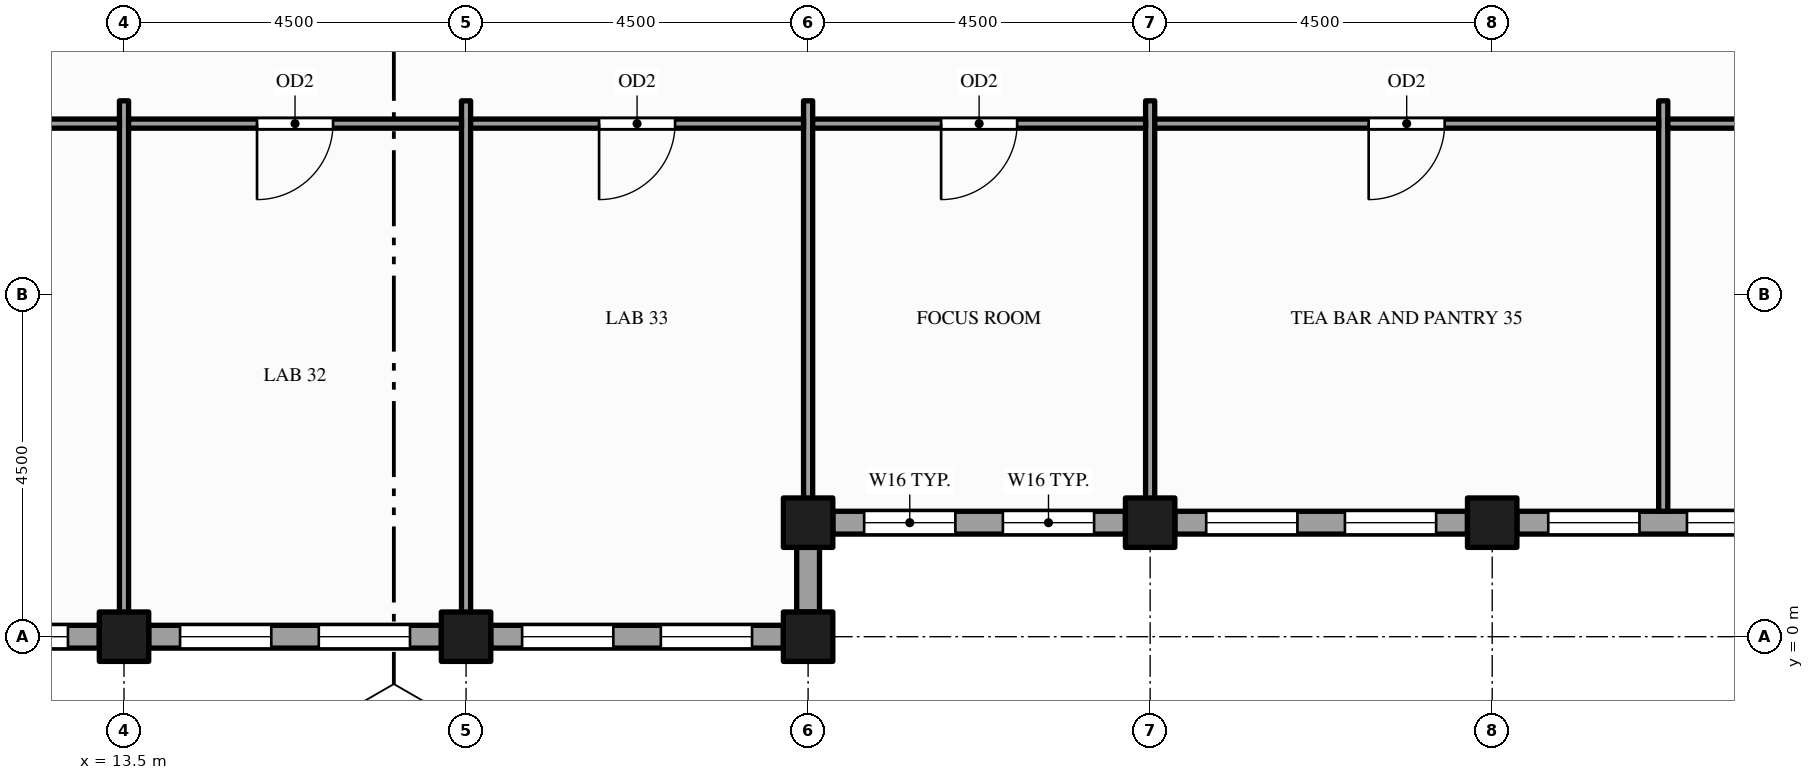
"""IFC4 building model, lengths in metres.
Left out: names, types, materials, properties, quantities, classifications, styles, units other than length and angle.
Written with IfcOpenShell. Run it as: python <this file> out.ifc"""

import sys

from ifc_helpers import new_model, si_unit, direction, frame, frame_2d, origin, origin_2d, place, context, subcontext, project, spatial, rectangle, hollow_rectangle, extrude, element, fill, save


model = new_model("IFC4")
c1 = context("Model", 3, precision=1e-05, world=origin(), true_north=direction((0.0, 1.0)))
c2 = subcontext(c1, "Body", "Model", "MODEL_VIEW")
j1 = project(units=[si_unit("LENGTHUNIT", "METRE"), si_unit("PLANEANGLEUNIT", "RADIAN")], contexts=[c1])
p1 = place(None, origin())
s1 = spatial("IfcSite", under=j1, at=p1, CompositionType="ELEMENT")
p2 = place(p1, origin())
s2 = spatial("IfcBuilding", under=s1, at=p2, CompositionType="ELEMENT")
p3 = place(p2, frame((0.0, 0.0, 273.0)))
s3 = spatial("IfcBuildingStorey", under=s2, at=p3, CompositionType="ELEMENT", Elevation=273.0)
for number, where, z_axis, x_axis in (
    (1, (13.5, 0.0, -0.15), (0.0, 0.0, 1.0), (1.0, 0.0, 0.0)),
    (2, (18.0, 0.0, -0.15), (0.0, 0.0, 1.0), (1.0, 0.0, 0.0)),
    (3, (22.5, 0.0, -0.15), (0.0, 0.0, 1.0), (1.0, 0.0, 0.0)),
    (4, (22.5, 1.5, -0.15), (0.0, 0.0, 1.0), (1.0, 0.0, 0.0)),
    (5, (27.0, 1.5, -0.15), (0.0, 0.0, 1.0), (1.0, 0.0, 0.0)),
    (6, (31.5, 1.5, -0.15), (0.0, 0.0, 1.0), (1.0, 0.0, 0.0)),
):
    element("IfcColumn", number, at=place(p3, frame(where, z_axis=z_axis, x_axis=x_axis)), inside=s3, PredefinedType="COLUMN", context=c2, shape_type="SweptSolid", body=[
        extrude(hollow_rectangle(XDim=0.65, YDim=0.65, WallThickness=0.032, at=origin_2d()), origin(), (0.0, 0.0, 1.0), 4.0),
    ])
p4 = place(p3, frame((22.5, 0.325, 0.0), z_axis=(0.0, 0.0, 1.0), x_axis=(0.0, 1.0, 0.0)))
e7 = element("IfcWall", 7, at=p4, inside=s3, PredefinedType="STANDARD", context=c2, shape_type="SweptSolid", body=[
    extrude(rectangle(XDim=0.85, YDim=0.3, at=frame_2d((0.425, 0.0))), origin(), (0.0, 0.0, 1.0), 3.162),
])
p5 = place(p3, frame((22.825, 1.5, 0.0), z_axis=(0.0, 0.0, 1.0), x_axis=(1.0, 0.0, 0.0)))
e8 = element("IfcWall", 8, at=p5, inside=s3, PredefinedType="STANDARD", context=c2, shape_type="SweptSolid", body=[
    extrude(rectangle(XDim=3.85, YDim=0.3, at=frame_2d((1.925, 0.0))), origin(), (0.0, 0.0, 1.0), 2.87),
])
p6 = place(p5, frame((0.413, 0.0, 0.9)))
e9 = element("IfcOpeningElement", 9, at=p6, cuts=e8, PredefinedType="OPENING", context=c2, shape_type="SweptSolid", body=[
    extrude(rectangle(XDim=1.2, YDim=1.75, at=frame_2d((0.6, 0.875))), frame((0.0, 0.16, 0.0), z_axis=(0.0, -1.0, 0.0), x_axis=(1.0, 0.0, 0.0)), (0.0, 0.0, 1.0), 0.32),
])
p7 = place(p5, frame((2.238, 0.0, 0.9)))
e10 = element("IfcOpeningElement", 10, at=p7, cuts=e8, PredefinedType="OPENING", context=c2, shape_type="SweptSolid", body=[
    extrude(rectangle(XDim=1.2, YDim=1.75, at=frame_2d((0.6, 0.875))), frame((0.0, 0.16, 0.0), z_axis=(0.0, -1.0, 0.0), x_axis=(1.0, 0.0, 0.0)), (0.0, 0.0, 1.0), 0.32),
])
p8 = place(p3, frame((27.325, 1.5, 0.0), z_axis=(0.0, 0.0, 1.0), x_axis=(1.0, 0.0, 0.0)))
e11 = element("IfcWall", 11, at=p8, inside=s3, PredefinedType="STANDARD", context=c2, shape_type="SweptSolid", body=[
    extrude(rectangle(XDim=3.85, YDim=0.3, at=frame_2d((1.925, 0.0))), origin(), (0.0, 0.0, 1.0), 2.87),
])
p9 = place(p8, frame((0.413, 0.0, 0.9)))
e12 = element("IfcOpeningElement", 12, at=p9, cuts=e11, PredefinedType="OPENING", context=c2, shape_type="SweptSolid", body=[
    extrude(rectangle(XDim=1.2, YDim=1.75, at=frame_2d((0.6, 0.875))), frame((0.0, 0.16, 0.0), z_axis=(0.0, -1.0, 0.0), x_axis=(1.0, 0.0, 0.0)), (0.0, 0.0, 1.0), 0.32),
])
p10 = place(p8, frame((2.238, 0.0, 0.9)))
e13 = element("IfcOpeningElement", 13, at=p10, cuts=e11, PredefinedType="OPENING", context=c2, shape_type="SweptSolid", body=[
    extrude(rectangle(XDim=1.2, YDim=1.75, at=frame_2d((0.6, 0.875))), frame((0.0, 0.16, 0.0), z_axis=(0.0, -1.0, 0.0), x_axis=(1.0, 0.0, 0.0)), (0.0, 0.0, 1.0), 0.32),
])
p11 = place(p3, frame((31.825, 1.5, 0.0), z_axis=(0.0, 0.0, 1.0), x_axis=(1.0, 0.0, 0.0)))
e14 = element("IfcWall", 14, at=p11, inside=s3, PredefinedType="STANDARD", context=c2, shape_type="SweptSolid", body=[
    extrude(rectangle(XDim=3.85, YDim=0.3, at=frame_2d((1.925, 0.0))), origin(), (0.0, 0.0, 1.0), 2.87),
])
p12 = place(p11, frame((0.413, 0.0, 0.9)))
e15 = element("IfcOpeningElement", 15, at=p12, cuts=e14, PredefinedType="OPENING", context=c2, shape_type="SweptSolid", body=[
    extrude(rectangle(XDim=1.2, YDim=1.75, at=frame_2d((0.6, 0.875))), frame((0.0, 0.16, 0.0), z_axis=(0.0, -1.0, 0.0), x_axis=(1.0, 0.0, 0.0)), (0.0, 0.0, 1.0), 0.32),
])
p13 = place(p11, frame((2.238, 0.0, 0.9)))
e16 = element("IfcOpeningElement", 16, at=p13, cuts=e14, PredefinedType="OPENING", context=c2, shape_type="SweptSolid", body=[
    extrude(rectangle(XDim=1.2, YDim=1.75, at=frame_2d((0.6, 0.875))), frame((0.0, 0.16, 0.0), z_axis=(0.0, -1.0, 0.0), x_axis=(1.0, 0.0, 0.0)), (0.0, 0.0, 1.0), 0.32),
])
p14 = place(p3, frame((9.325, 0.0, 0.0), z_axis=(0.0, 0.0, 1.0), x_axis=(1.0, 0.0, 0.0)))
e17 = element("IfcWall", 17, at=p14, inside=s3, PredefinedType="STANDARD", context=c2, shape_type="SweptSolid", body=[
    extrude(rectangle(XDim=3.85, YDim=0.3, at=frame_2d((1.925, 0.0))), origin(), (0.0, 0.0, 1.0), 2.87),
])
p15 = place(p14, frame((0.413, 0.0, 0.9)))
e18 = element("IfcOpeningElement", 18, at=p15, cuts=e17, PredefinedType="OPENING", context=c2, shape_type="SweptSolid", body=[
    extrude(rectangle(XDim=1.2, YDim=1.75, at=frame_2d((0.6, 0.875))), frame((0.0, 0.16, 0.0), z_axis=(0.0, -1.0, 0.0), x_axis=(1.0, 0.0, 0.0)), (0.0, 0.0, 1.0), 0.32),
])
p16 = place(p14, frame((2.238, 0.0, 0.9)))
e19 = element("IfcOpeningElement", 19, at=p16, cuts=e17, PredefinedType="OPENING", context=c2, shape_type="SweptSolid", body=[
    extrude(rectangle(XDim=1.2, YDim=1.75, at=frame_2d((0.6, 0.875))), frame((0.0, 0.16, 0.0), z_axis=(0.0, -1.0, 0.0), x_axis=(1.0, 0.0, 0.0)), (0.0, 0.0, 1.0), 0.32),
])
p17 = place(p3, frame((13.825, 0.0, 0.0), z_axis=(0.0, 0.0, 1.0), x_axis=(1.0, 0.0, 0.0)))
e20 = element("IfcWall", 20, at=p17, inside=s3, PredefinedType="STANDARD", context=c2, shape_type="SweptSolid", body=[
    extrude(rectangle(XDim=3.85, YDim=0.3, at=frame_2d((1.925, 0.0))), origin(), (0.0, 0.0, 1.0), 2.87),
])
p18 = place(p17, frame((0.413, 0.0, 0.9)))
e21 = element("IfcOpeningElement", 21, at=p18, cuts=e20, PredefinedType="OPENING", context=c2, shape_type="SweptSolid", body=[
    extrude(rectangle(XDim=1.2, YDim=1.75, at=frame_2d((0.6, 0.875))), frame((0.0, 0.16, 0.0), z_axis=(0.0, -1.0, 0.0), x_axis=(1.0, 0.0, 0.0)), (0.0, 0.0, 1.0), 0.32),
])
p19 = place(p17, frame((2.238, 0.0, 0.9)))
e22 = element("IfcOpeningElement", 22, at=p19, cuts=e20, PredefinedType="OPENING", context=c2, shape_type="SweptSolid", body=[
    extrude(rectangle(XDim=1.2, YDim=1.75, at=frame_2d((0.6, 0.875))), frame((0.0, 0.16, 0.0), z_axis=(0.0, -1.0, 0.0), x_axis=(1.0, 0.0, 0.0)), (0.0, 0.0, 1.0), 0.32),
])
p20 = place(p3, frame((18.325, 0.0, 0.0), z_axis=(0.0, 0.0, 1.0), x_axis=(1.0, 0.0, 0.0)))
e23 = element("IfcWall", 23, at=p20, inside=s3, PredefinedType="STANDARD", context=c2, shape_type="SweptSolid", body=[
    extrude(rectangle(XDim=3.85, YDim=0.3, at=frame_2d((1.925, 0.0))), origin(), (0.0, 0.0, 1.0), 2.87),
])
p21 = place(p20, frame((0.413, 0.0, 0.9)))
e24 = element("IfcOpeningElement", 24, at=p21, cuts=e23, PredefinedType="OPENING", context=c2, shape_type="SweptSolid", body=[
    extrude(rectangle(XDim=1.2, YDim=1.75, at=frame_2d((0.6, 0.875))), frame((0.0, 0.16, 0.0), z_axis=(0.0, -1.0, 0.0), x_axis=(1.0, 0.0, 0.0)), (0.0, 0.0, 1.0), 0.32),
])
p22 = place(p20, frame((2.238, 0.0, 0.9)))
e25 = element("IfcOpeningElement", 25, at=p22, cuts=e23, PredefinedType="OPENING", context=c2, shape_type="SweptSolid", body=[
    extrude(rectangle(XDim=1.2, YDim=1.75, at=frame_2d((0.6, 0.875))), frame((0.0, 0.16, 0.0), z_axis=(0.0, -1.0, 0.0), x_axis=(1.0, 0.0, 0.0)), (0.0, 0.0, 1.0), 0.32),
])
for number, where, z_axis, x_axis in (
    (26, (13.5, 0.15, 0.0), (0.0, 0.0, 1.0), (0.0, 1.0, 0.0)),
    (27, (18.0, 0.15, 0.0), (0.0, 0.0, 1.0), (0.0, 1.0, 0.0)),
):
    element("IfcWall", number, at=place(p3, frame(where, z_axis=z_axis, x_axis=x_axis)), inside=s3, PredefinedType="PARTITIONING", context=c2, shape_type="SweptSolid", body=[
        extrude(rectangle(XDim=6.9, YDim=0.12, at=frame_2d((3.45, 0.0))), origin(), (0.0, 0.0, 1.0), 2.87),
    ])
for number, where, z_axis, x_axis in (
    (28, (22.5, 1.65, 0.0), (0.0, 0.0, 1.0), (0.0, 1.0, 0.0)),
    (29, (27.0, 1.65, 0.0), (0.0, 0.0, 1.0), (0.0, 1.0, 0.0)),
    (30, (33.75, 1.65, 0.0), (0.0, 0.0, 1.0), (0.0, 1.0, 0.0)),
):
    element("IfcWall", number, at=place(p3, frame(where, z_axis=z_axis, x_axis=x_axis)), inside=s3, PredefinedType="PARTITIONING", context=c2, shape_type="SweptSolid", body=[
        extrude(rectangle(XDim=5.4, YDim=0.12, at=frame_2d((2.7, 0.0))), origin(), (0.0, 0.0, 1.0), 2.87),
    ])
p23 = place(p3, frame((9.06, 6.75, 0.0), z_axis=(0.0, 0.0, 1.0), x_axis=(1.0, 0.0, 0.0)))
e31 = element("IfcWall", 31, at=p23, inside=s3, PredefinedType="PARTITIONING", context=c2, shape_type="SweptSolid", body=[
    extrude(rectangle(XDim=4.38, YDim=0.12, at=frame_2d((2.19, 0.0))), origin(), (0.0, 0.0, 1.0), 2.87),
])
p24 = place(p23, frame((1.69, 0.0, 0.0)))
e32 = element("IfcOpeningElement", 32, at=p24, cuts=e31, PredefinedType="OPENING", context=c2, shape_type="SweptSolid", body=[
    extrude(rectangle(XDim=1.0, YDim=2.1, at=frame_2d((0.5, 1.05))), frame((0.0, 0.07, 0.0), z_axis=(0.0, -1.0, 0.0), x_axis=(1.0, 0.0, 0.0)), (0.0, 0.0, 1.0), 0.14),
])
p25 = place(p3, frame((13.56, 6.75, 0.0), z_axis=(0.0, 0.0, 1.0), x_axis=(1.0, 0.0, 0.0)))
e33 = element("IfcWall", 33, at=p25, inside=s3, PredefinedType="PARTITIONING", context=c2, shape_type="SweptSolid", body=[
    extrude(rectangle(XDim=4.38, YDim=0.12, at=frame_2d((2.19, 0.0))), origin(), (0.0, 0.0, 1.0), 2.87),
])
p26 = place(p25, frame((1.69, 0.0, 0.0)))
e34 = element("IfcOpeningElement", 34, at=p26, cuts=e33, PredefinedType="OPENING", context=c2, shape_type="SweptSolid", body=[
    extrude(rectangle(XDim=1.0, YDim=2.1, at=frame_2d((0.5, 1.05))), frame((0.0, 0.07, 0.0), z_axis=(0.0, -1.0, 0.0), x_axis=(1.0, 0.0, 0.0)), (0.0, 0.0, 1.0), 0.14),
])
p27 = place(p3, frame((18.06, 6.75, 0.0), z_axis=(0.0, 0.0, 1.0), x_axis=(1.0, 0.0, 0.0)))
e35 = element("IfcWall", 35, at=p27, inside=s3, PredefinedType="PARTITIONING", context=c2, shape_type="SweptSolid", body=[
    extrude(rectangle(XDim=4.38, YDim=0.12, at=frame_2d((2.19, 0.0))), origin(), (0.0, 0.0, 1.0), 2.87),
])
p28 = place(p27, frame((1.69, 0.0, 0.0)))
e36 = element("IfcOpeningElement", 36, at=p28, cuts=e35, PredefinedType="OPENING", context=c2, shape_type="SweptSolid", body=[
    extrude(rectangle(XDim=1.0, YDim=2.1, at=frame_2d((0.5, 1.05))), frame((0.0, 0.07, 0.0), z_axis=(0.0, -1.0, 0.0), x_axis=(1.0, 0.0, 0.0)), (0.0, 0.0, 1.0), 0.14),
])
p29 = place(p3, frame((22.56, 6.75, 0.0), z_axis=(0.0, 0.0, 1.0), x_axis=(1.0, 0.0, 0.0)))
e37 = element("IfcWall", 37, at=p29, inside=s3, PredefinedType="PARTITIONING", context=c2, shape_type="SweptSolid", body=[
    extrude(rectangle(XDim=4.38, YDim=0.12, at=frame_2d((2.19, 0.0))), origin(), (0.0, 0.0, 1.0), 2.87),
])
p30 = place(p29, frame((1.69, 0.0, 0.0)))
e38 = element("IfcOpeningElement", 38, at=p30, cuts=e37, PredefinedType="OPENING", context=c2, shape_type="SweptSolid", body=[
    extrude(rectangle(XDim=1.0, YDim=2.1, at=frame_2d((0.5, 1.05))), frame((0.0, 0.07, 0.0), z_axis=(0.0, -1.0, 0.0), x_axis=(1.0, 0.0, 0.0)), (0.0, 0.0, 1.0), 0.14),
])
p31 = place(p3, frame((27.06, 6.75, 0.0), z_axis=(0.0, 0.0, 1.0), x_axis=(1.0, 0.0, 0.0)))
e39 = element("IfcWall", 39, at=p31, inside=s3, PredefinedType="PARTITIONING", context=c2, shape_type="SweptSolid", body=[
    extrude(rectangle(XDim=6.63, YDim=0.12, at=frame_2d((3.315, 0.0))), origin(), (0.0, 0.0, 1.0), 2.87),
])
p32 = place(p31, frame((2.815, 0.0, 0.0)))
e40 = element("IfcOpeningElement", 40, at=p32, cuts=e39, PredefinedType="OPENING", context=c2, shape_type="SweptSolid", body=[
    extrude(rectangle(XDim=1.0, YDim=2.1, at=frame_2d((0.5, 1.05))), frame((0.0, 0.07, 0.0), z_axis=(0.0, -1.0, 0.0), x_axis=(1.0, 0.0, 0.0)), (0.0, 0.0, 1.0), 0.14),
])
p33 = place(p3, frame((33.81, 6.75, 0.0), z_axis=(0.0, 0.0, 1.0), x_axis=(1.0, 0.0, 0.0)))
e41 = element("IfcWall", 41, at=p33, inside=s3, PredefinedType="PARTITIONING", context=c2, shape_type="SweptSolid", body=[
    extrude(rectangle(XDim=6.63, YDim=0.12, at=frame_2d((3.315, 0.0))), origin(), (0.0, 0.0, 1.0), 2.87),
])
p34 = place(p33, frame((2.865, 0.0, 0.0)))
e42 = element("IfcOpeningElement", 42, at=p34, cuts=e41, PredefinedType="OPENING", context=c2, shape_type="SweptSolid", body=[
    extrude(rectangle(XDim=0.9, YDim=2.1, at=frame_2d((0.45, 1.05))), frame((0.0, 0.07, 0.0), z_axis=(0.0, -1.0, 0.0), x_axis=(1.0, 0.0, 0.0)), (0.0, 0.0, 1.0), 0.14),
])
p35 = place(p6, origin())
e43 = element("IfcWindow", 43, at=p35, inside=s3, PartitioningType="SINGLE_PANEL", PredefinedType="WINDOW", context=c2, shape_type="SweptSolid", body=[
    extrude(rectangle(XDim=1.2, YDim=1.75, at=frame_2d((0.6, 0.875))), frame((0.0, 0.03, 0.0), z_axis=(0.0, -1.0, 0.0), x_axis=(1.0, 0.0, 0.0)), (0.0, 0.0, 1.0), 0.06),
])
fill(e9, e43)
p36 = place(p7, origin())
e44 = element("IfcWindow", 44, at=p36, inside=s3, PartitioningType="SINGLE_PANEL", PredefinedType="WINDOW", context=c2, shape_type="SweptSolid", body=[
    extrude(rectangle(XDim=1.2, YDim=1.75, at=frame_2d((0.6, 0.875))), frame((0.0, 0.03, 0.0), z_axis=(0.0, -1.0, 0.0), x_axis=(1.0, 0.0, 0.0)), (0.0, 0.0, 1.0), 0.06),
])
fill(e10, e44)
p37 = place(p9, origin())
e45 = element("IfcWindow", 45, at=p37, inside=s3, PartitioningType="SINGLE_PANEL", PredefinedType="WINDOW", context=c2, shape_type="SweptSolid", body=[
    extrude(rectangle(XDim=1.2, YDim=1.75, at=frame_2d((0.6, 0.875))), frame((0.0, 0.03, 0.0), z_axis=(0.0, -1.0, 0.0), x_axis=(1.0, 0.0, 0.0)), (0.0, 0.0, 1.0), 0.06),
])
fill(e12, e45)
p38 = place(p10, origin())
e46 = element("IfcWindow", 46, at=p38, inside=s3, PartitioningType="SINGLE_PANEL", PredefinedType="WINDOW", context=c2, shape_type="SweptSolid", body=[
    extrude(rectangle(XDim=1.2, YDim=1.75, at=frame_2d((0.6, 0.875))), frame((0.0, 0.03, 0.0), z_axis=(0.0, -1.0, 0.0), x_axis=(1.0, 0.0, 0.0)), (0.0, 0.0, 1.0), 0.06),
])
fill(e13, e46)
p39 = place(p12, origin())
e47 = element("IfcWindow", 47, at=p39, inside=s3, PartitioningType="SINGLE_PANEL", PredefinedType="WINDOW", context=c2, shape_type="SweptSolid", body=[
    extrude(rectangle(XDim=1.2, YDim=1.75, at=frame_2d((0.6, 0.875))), frame((0.0, 0.03, 0.0), z_axis=(0.0, -1.0, 0.0), x_axis=(1.0, 0.0, 0.0)), (0.0, 0.0, 1.0), 0.06),
])
fill(e15, e47)
p40 = place(p13, origin())
e48 = element("IfcWindow", 48, at=p40, inside=s3, PartitioningType="SINGLE_PANEL", PredefinedType="WINDOW", context=c2, shape_type="SweptSolid", body=[
    extrude(rectangle(XDim=1.2, YDim=1.75, at=frame_2d((0.6, 0.875))), frame((0.0, 0.03, 0.0), z_axis=(0.0, -1.0, 0.0), x_axis=(1.0, 0.0, 0.0)), (0.0, 0.0, 1.0), 0.06),
])
fill(e16, e48)
p41 = place(p16, origin())
e49 = element("IfcWindow", 49, at=p41, inside=s3, PartitioningType="SINGLE_PANEL", PredefinedType="WINDOW", context=c2, shape_type="SweptSolid", body=[
    extrude(rectangle(XDim=1.2, YDim=1.75, at=frame_2d((0.6, 0.875))), frame((0.0, 0.03, 0.0), z_axis=(0.0, -1.0, 0.0), x_axis=(1.0, 0.0, 0.0)), (0.0, 0.0, 1.0), 0.06),
])
fill(e19, e49)
p42 = place(p18, origin())
e50 = element("IfcWindow", 50, at=p42, inside=s3, PartitioningType="SINGLE_PANEL", PredefinedType="WINDOW", context=c2, shape_type="SweptSolid", body=[
    extrude(rectangle(XDim=1.2, YDim=1.75, at=frame_2d((0.6, 0.875))), frame((0.0, 0.03, 0.0), z_axis=(0.0, -1.0, 0.0), x_axis=(1.0, 0.0, 0.0)), (0.0, 0.0, 1.0), 0.06),
])
fill(e21, e50)
p43 = place(p19, origin())
e51 = element("IfcWindow", 51, at=p43, inside=s3, PartitioningType="SINGLE_PANEL", PredefinedType="WINDOW", context=c2, shape_type="SweptSolid", body=[
    extrude(rectangle(XDim=1.2, YDim=1.75, at=frame_2d((0.6, 0.875))), frame((0.0, 0.03, 0.0), z_axis=(0.0, -1.0, 0.0), x_axis=(1.0, 0.0, 0.0)), (0.0, 0.0, 1.0), 0.06),
])
fill(e22, e51)
p44 = place(p21, origin())
e52 = element("IfcWindow", 52, at=p44, inside=s3, PartitioningType="SINGLE_PANEL", PredefinedType="WINDOW", context=c2, shape_type="SweptSolid", body=[
    extrude(rectangle(XDim=1.2, YDim=1.75, at=frame_2d((0.6, 0.875))), frame((0.0, 0.03, 0.0), z_axis=(0.0, -1.0, 0.0), x_axis=(1.0, 0.0, 0.0)), (0.0, 0.0, 1.0), 0.06),
])
fill(e24, e52)
p45 = place(p22, origin())
e53 = element("IfcWindow", 53, at=p45, inside=s3, PartitioningType="SINGLE_PANEL", PredefinedType="WINDOW", context=c2, shape_type="SweptSolid", body=[
    extrude(rectangle(XDim=1.2, YDim=1.75, at=frame_2d((0.6, 0.875))), frame((0.0, 0.03, 0.0), z_axis=(0.0, -1.0, 0.0), x_axis=(1.0, 0.0, 0.0)), (0.0, 0.0, 1.0), 0.06),
])
fill(e25, e53)
p46 = place(p26, origin())
e54 = element("IfcDoor", 54, at=p46, inside=s3, OperationType="SINGLE_SWING_LEFT", PredefinedType="DOOR", context=c2, shape_type="SweptSolid", body=[
    extrude(rectangle(XDim=1.0, YDim=2.1, at=frame_2d((0.5, 1.05))), frame((0.0, 0.025, 0.0), z_axis=(0.0, -1.0, 0.0), x_axis=(1.0, 0.0, 0.0)), (0.0, 0.0, 1.0), 0.05),
])
fill(e34, e54)
p47 = place(p28, origin())
e55 = element("IfcDoor", 55, at=p47, inside=s3, OperationType="SINGLE_SWING_LEFT", PredefinedType="DOOR", context=c2, shape_type="SweptSolid", body=[
    extrude(rectangle(XDim=1.0, YDim=2.1, at=frame_2d((0.5, 1.05))), frame((0.0, 0.025, 0.0), z_axis=(0.0, -1.0, 0.0), x_axis=(1.0, 0.0, 0.0)), (0.0, 0.0, 1.0), 0.05),
])
fill(e36, e55)
p48 = place(p30, origin())
e56 = element("IfcDoor", 56, at=p48, inside=s3, OperationType="SINGLE_SWING_LEFT", PredefinedType="DOOR", context=c2, shape_type="SweptSolid", body=[
    extrude(rectangle(XDim=1.0, YDim=2.1, at=frame_2d((0.5, 1.05))), frame((0.0, 0.025, 0.0), z_axis=(0.0, -1.0, 0.0), x_axis=(1.0, 0.0, 0.0)), (0.0, 0.0, 1.0), 0.05),
])
fill(e38, e56)
p49 = place(p32, origin())
e57 = element("IfcDoor", 57, at=p49, inside=s3, OperationType="SINGLE_SWING_LEFT", PredefinedType="DOOR", context=c2, shape_type="SweptSolid", body=[
    extrude(rectangle(XDim=1.0, YDim=2.1, at=frame_2d((0.5, 1.05))), frame((0.0, 0.025, 0.0), z_axis=(0.0, -1.0, 0.0), x_axis=(1.0, 0.0, 0.0)), (0.0, 0.0, 1.0), 0.05),
])
fill(e40, e57)
save(model, sys.argv[1])
